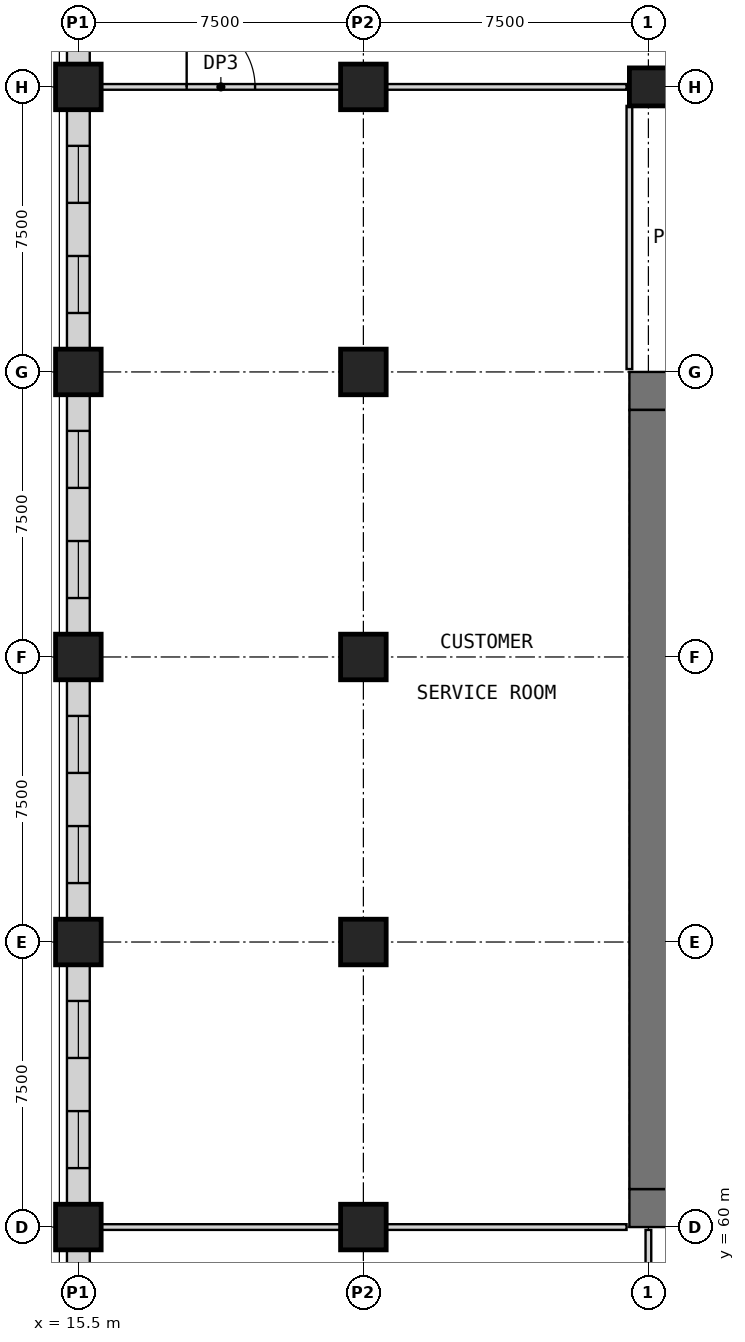
"""IFC4 building model, lengths in metres.
Left out: names, types, materials, properties, quantities, classifications, styles, units other than length and angle.
Written with IfcOpenShell. Run it as: python <this file> out.ifc"""

import sys

from ifc_helpers import new_model, si_unit, direction, frame, frame_2d, origin, origin_2d, place, context, subcontext, project, spatial, rectangle, extrude, element, fill, save


model = new_model("IFC4")
c1 = context("Model", 3, precision=1e-05, world=origin(), true_north=direction((0.0, 1.0)))
c2 = subcontext(c1, "Body", "Model", "MODEL_VIEW")
j1 = project(units=[si_unit("LENGTHUNIT", "METRE"), si_unit("PLANEANGLEUNIT", "RADIAN")], contexts=[c1])
p1 = place(None, origin())
s1 = spatial("IfcSite", under=j1, at=p1, CompositionType="ELEMENT")
p2 = place(p1, origin())
s2 = spatial("IfcBuilding", under=s1, at=p2, CompositionType="ELEMENT")
p3 = place(p2, frame((0.0, 0.0, 13.5)))
s3 = spatial("IfcBuildingStorey", under=s2, at=p3, CompositionType="ELEMENT", Elevation=13.5)
p4 = place(p3, frame((30.5, 90.0, 0.0), z_axis=(0.0, 0.0, 1.0), x_axis=(1.0, 0.0, 0.0)))
e1 = element("IfcColumn", 1, at=p4, inside=s3, PredefinedType="COLUMN", context=c2, shape_type="SweptSolid", body=[
    extrude(rectangle(XDim=1.0, YDim=1.0, at=origin_2d()), origin(), (0.0, 0.0, 1.0), 5.0),
])
for number, where, z_axis, x_axis in (
    (2, (15.5, 60.0, 0.0), (0.0, 0.0, 1.0), (1.0, 0.0, 0.0)),
    (3, (15.5, 67.5, 0.0), (0.0, 0.0, 1.0), (1.0, 0.0, 0.0)),
    (4, (15.5, 75.0, 0.0), (0.0, 0.0, 1.0), (1.0, 0.0, 0.0)),
    (5, (15.5, 82.5, 0.0), (0.0, 0.0, 1.0), (1.0, 0.0, 0.0)),
    (6, (15.5, 90.0, 0.0), (0.0, 0.0, 1.0), (1.0, 0.0, 0.0)),
    (7, (23.0, 60.0, 0.0), (0.0, 0.0, 1.0), (1.0, 0.0, 0.0)),
    (8, (23.0, 67.5, 0.0), (0.0, 0.0, 1.0), (1.0, 0.0, 0.0)),
    (9, (23.0, 75.0, 0.0), (0.0, 0.0, 1.0), (1.0, 0.0, 0.0)),
    (10, (23.0, 82.5, 0.0), (0.0, 0.0, 1.0), (1.0, 0.0, 0.0)),
    (11, (23.0, 90.0, 0.0), (0.0, 0.0, 1.0), (1.0, 0.0, 0.0)),
):
    element("IfcColumn", number, at=place(p3, frame(where, z_axis=z_axis, x_axis=x_axis)), inside=s3, PredefinedType="COLUMN", context=c2, shape_type="SweptSolid", body=[
        extrude(rectangle(XDim=1.2, YDim=1.2, at=origin_2d()), origin(), (0.0, 0.0, 1.0), 5.0),
    ])
p5 = place(p3, frame((30.0, 60.5, 0.0), z_axis=(0.0, 0.0, 1.0), x_axis=(1.0, 0.0, 0.0)))
e12 = element("IfcWall", 12, at=p5, inside=s3, PredefinedType="SHEAR", context=c2, shape_type="SweptSolid", body=[
    extrude(rectangle(XDim=30.0, YDim=1.0, at=frame_2d((15.0, 0.0))), origin(), (0.0, 0.0, 1.0), 5.0),
])
p6 = place(p5, frame((21.9, 0.0, 0.0)))
e13 = element("IfcOpeningElement", 13, at=p6, cuts=e12, PredefinedType="OPENING", context=c2, shape_type="SweptSolid", body=[
    extrude(rectangle(XDim=1.8, YDim=2.1, at=frame_2d((0.9, 1.05))), frame((0.0, 0.51, 0.0), z_axis=(0.0, -1.0, 0.0), x_axis=(1.0, 0.0, 0.0)), (0.0, 0.0, 1.0), 1.02),
])
p7 = place(p5, frame((26.5, 0.0, 0.0)))
e14 = element("IfcOpeningElement", 14, at=p7, cuts=e12, PredefinedType="OPENING", context=c2, shape_type="SweptSolid", body=[
    extrude(rectangle(XDim=1.2, YDim=2.1, at=frame_2d((0.6, 1.05))), frame((0.0, 0.51, 0.0), z_axis=(0.0, -1.0, 0.0), x_axis=(1.0, 0.0, 0.0)), (0.0, 0.0, 1.0), 1.02),
])
p8 = place(p3, frame((30.0, 82.0, 0.0), z_axis=(0.0, 0.0, 1.0), x_axis=(1.0, 0.0, 0.0)))
e15 = element("IfcWall", 15, at=p8, inside=s3, PredefinedType="SHEAR", context=c2, shape_type="SweptSolid", body=[
    extrude(rectangle(XDim=30.0, YDim=1.0, at=frame_2d((15.0, 0.0))), origin(), (0.0, 0.0, 1.0), 5.0),
])
p9 = place(p3, frame((30.5, 61.0, 0.0), z_axis=(0.0, 0.0, 1.0), x_axis=(0.0, 1.0, 0.0)))
e16 = element("IfcWall", 16, at=p9, inside=s3, PredefinedType="SHEAR", context=c2, shape_type="SweptSolid", body=[
    extrude(rectangle(XDim=20.5, YDim=1.0, at=frame_2d((10.25, 0.0))), origin(), (0.0, 0.0, 1.0), 5.0),
])
p10 = place(p3, frame((16.1, 60.0, 0.0), z_axis=(0.0, 0.0, 1.0), x_axis=(1.0, 0.0, 0.0)))
e17 = element("IfcWall", 17, at=p10, inside=s3, PredefinedType="PARTITIONING", context=c2, shape_type="SweptSolid", body=[
    extrude(rectangle(XDim=6.3, YDim=0.15, at=frame_2d((3.15, 0.0))), origin(), (0.0, 0.0, 1.0), 4.7),
])
p11 = place(p3, frame((23.6, 60.0, 0.0), z_axis=(0.0, 0.0, 1.0), x_axis=(1.0, 0.0, 0.0)))
e18 = element("IfcWall", 18, at=p11, inside=s3, PredefinedType="PARTITIONING", context=c2, shape_type="SweptSolid", body=[
    extrude(rectangle(XDim=6.325, YDim=0.15, at=frame_2d((3.163, 0.0))), origin(), (0.0, 0.0, 1.0), 4.7),
])
p12 = place(p3, frame((16.1, 90.0, 0.0), z_axis=(0.0, 0.0, 1.0), x_axis=(1.0, 0.0, 0.0)))
e19 = element("IfcWall", 19, at=p12, inside=s3, PredefinedType="PARTITIONING", context=c2, shape_type="SweptSolid", body=[
    extrude(rectangle(XDim=6.3, YDim=0.15, at=frame_2d((3.15, 0.0))), origin(), (0.0, 0.0, 1.0), 4.7),
])
p13 = place(p12, frame((2.25, 0.0, 0.0)))
e20 = element("IfcOpeningElement", 20, at=p13, cuts=e19, PredefinedType="OPENING", context=c2, shape_type="SweptSolid", body=[
    extrude(rectangle(XDim=1.8, YDim=2.4, at=frame_2d((0.9, 1.2))), frame((0.0, 0.085, 0.0), z_axis=(0.0, -1.0, 0.0), x_axis=(1.0, 0.0, 0.0)), (0.0, 0.0, 1.0), 0.17),
])
p14 = place(p3, frame((23.6, 90.0, 0.0), z_axis=(0.0, 0.0, 1.0), x_axis=(1.0, 0.0, 0.0)))
e21 = element("IfcWall", 21, at=p14, inside=s3, PredefinedType="PARTITIONING", context=c2, shape_type="SweptSolid", body=[
    extrude(rectangle(XDim=6.325, YDim=0.15, at=frame_2d((3.163, 0.0))), origin(), (0.0, 0.0, 1.0), 4.7),
])
p15 = place(p3, frame((15.5, 53.1, 0.0), z_axis=(0.0, 0.0, 1.0), x_axis=(0.0, 1.0, 0.0)))
e22 = element("IfcWall", 22, at=p15, inside=s3, PredefinedType="PARTITIONING", context=c2, shape_type="SweptSolid", body=[
    extrude(rectangle(XDim=6.3, YDim=0.6, at=frame_2d((3.15, 0.0))), origin(), (0.0, 0.0, 1.0), 4.1),
])
p16 = place(p15, frame((0.951, 0.0, 0.9)))
e23 = element("IfcOpeningElement", 23, at=p16, cuts=e22, PredefinedType="OPENING", context=c2, shape_type="SweptSolid", body=[
    extrude(rectangle(XDim=1.5, YDim=2.8, at=frame_2d((0.75, 1.4))), frame((0.0, 0.31, 0.0), z_axis=(0.0, -1.0, 0.0), x_axis=(1.0, 0.0, 0.0)), (0.0, 0.0, 1.0), 0.62),
])
p17 = place(p15, frame((3.849, 0.0, 0.9)))
e24 = element("IfcOpeningElement", 24, at=p17, cuts=e22, PredefinedType="OPENING", context=c2, shape_type="SweptSolid", body=[
    extrude(rectangle(XDim=1.5, YDim=2.8, at=frame_2d((0.75, 1.4))), frame((0.0, 0.31, 0.0), z_axis=(0.0, -1.0, 0.0), x_axis=(1.0, 0.0, 0.0)), (0.0, 0.0, 1.0), 0.62),
])
p18 = place(p3, frame((15.5, 60.6, 0.0), z_axis=(0.0, 0.0, 1.0), x_axis=(0.0, 1.0, 0.0)))
e25 = element("IfcWall", 25, at=p18, inside=s3, PredefinedType="PARTITIONING", context=c2, shape_type="SweptSolid", body=[
    extrude(rectangle(XDim=6.3, YDim=0.6, at=frame_2d((3.15, 0.0))), origin(), (0.0, 0.0, 1.0), 4.1),
])
p19 = place(p18, frame((0.951, 0.0, 0.9)))
e26 = element("IfcOpeningElement", 26, at=p19, cuts=e25, PredefinedType="OPENING", context=c2, shape_type="SweptSolid", body=[
    extrude(rectangle(XDim=1.5, YDim=2.8, at=frame_2d((0.75, 1.4))), frame((0.0, 0.31, 0.0), z_axis=(0.0, -1.0, 0.0), x_axis=(1.0, 0.0, 0.0)), (0.0, 0.0, 1.0), 0.62),
])
p20 = place(p18, frame((3.849, 0.0, 0.9)))
e27 = element("IfcOpeningElement", 27, at=p20, cuts=e25, PredefinedType="OPENING", context=c2, shape_type="SweptSolid", body=[
    extrude(rectangle(XDim=1.5, YDim=2.8, at=frame_2d((0.75, 1.4))), frame((0.0, 0.31, 0.0), z_axis=(0.0, -1.0, 0.0), x_axis=(1.0, 0.0, 0.0)), (0.0, 0.0, 1.0), 0.62),
])
p21 = place(p3, frame((15.5, 68.1, 0.0), z_axis=(0.0, 0.0, 1.0), x_axis=(0.0, 1.0, 0.0)))
e28 = element("IfcWall", 28, at=p21, inside=s3, PredefinedType="PARTITIONING", context=c2, shape_type="SweptSolid", body=[
    extrude(rectangle(XDim=6.3, YDim=0.6, at=frame_2d((3.15, 0.0))), origin(), (0.0, 0.0, 1.0), 4.1),
])
p22 = place(p21, frame((0.951, 0.0, 0.9)))
e29 = element("IfcOpeningElement", 29, at=p22, cuts=e28, PredefinedType="OPENING", context=c2, shape_type="SweptSolid", body=[
    extrude(rectangle(XDim=1.5, YDim=2.8, at=frame_2d((0.75, 1.4))), frame((0.0, 0.31, 0.0), z_axis=(0.0, -1.0, 0.0), x_axis=(1.0, 0.0, 0.0)), (0.0, 0.0, 1.0), 0.62),
])
p23 = place(p21, frame((3.849, 0.0, 0.9)))
e30 = element("IfcOpeningElement", 30, at=p23, cuts=e28, PredefinedType="OPENING", context=c2, shape_type="SweptSolid", body=[
    extrude(rectangle(XDim=1.5, YDim=2.8, at=frame_2d((0.75, 1.4))), frame((0.0, 0.31, 0.0), z_axis=(0.0, -1.0, 0.0), x_axis=(1.0, 0.0, 0.0)), (0.0, 0.0, 1.0), 0.62),
])
p24 = place(p3, frame((15.5, 75.6, 0.0), z_axis=(0.0, 0.0, 1.0), x_axis=(0.0, 1.0, 0.0)))
e31 = element("IfcWall", 31, at=p24, inside=s3, PredefinedType="PARTITIONING", context=c2, shape_type="SweptSolid", body=[
    extrude(rectangle(XDim=6.3, YDim=0.6, at=frame_2d((3.15, 0.0))), origin(), (0.0, 0.0, 1.0), 4.1),
])
p25 = place(p24, frame((0.951, 0.0, 0.9)))
e32 = element("IfcOpeningElement", 32, at=p25, cuts=e31, PredefinedType="OPENING", context=c2, shape_type="SweptSolid", body=[
    extrude(rectangle(XDim=1.5, YDim=2.8, at=frame_2d((0.75, 1.4))), frame((0.0, 0.31, 0.0), z_axis=(0.0, -1.0, 0.0), x_axis=(1.0, 0.0, 0.0)), (0.0, 0.0, 1.0), 0.62),
])
p26 = place(p24, frame((3.849, 0.0, 0.9)))
e33 = element("IfcOpeningElement", 33, at=p26, cuts=e31, PredefinedType="OPENING", context=c2, shape_type="SweptSolid", body=[
    extrude(rectangle(XDim=1.5, YDim=2.8, at=frame_2d((0.75, 1.4))), frame((0.0, 0.31, 0.0), z_axis=(0.0, -1.0, 0.0), x_axis=(1.0, 0.0, 0.0)), (0.0, 0.0, 1.0), 0.62),
])
p27 = place(p3, frame((15.5, 83.1, 0.0), z_axis=(0.0, 0.0, 1.0), x_axis=(0.0, 1.0, 0.0)))
e34 = element("IfcWall", 34, at=p27, inside=s3, PredefinedType="PARTITIONING", context=c2, shape_type="SweptSolid", body=[
    extrude(rectangle(XDim=6.3, YDim=0.6, at=frame_2d((3.15, 0.0))), origin(), (0.0, 0.0, 1.0), 4.1),
])
p28 = place(p27, frame((0.951, 0.0, 0.9)))
e35 = element("IfcOpeningElement", 35, at=p28, cuts=e34, PredefinedType="OPENING", context=c2, shape_type="SweptSolid", body=[
    extrude(rectangle(XDim=1.5, YDim=2.8, at=frame_2d((0.75, 1.4))), frame((0.0, 0.31, 0.0), z_axis=(0.0, -1.0, 0.0), x_axis=(1.0, 0.0, 0.0)), (0.0, 0.0, 1.0), 0.62),
])
p29 = place(p27, frame((3.849, 0.0, 0.9)))
e36 = element("IfcOpeningElement", 36, at=p29, cuts=e34, PredefinedType="OPENING", context=c2, shape_type="SweptSolid", body=[
    extrude(rectangle(XDim=1.5, YDim=2.8, at=frame_2d((0.75, 1.4))), frame((0.0, 0.31, 0.0), z_axis=(0.0, -1.0, 0.0), x_axis=(1.0, 0.0, 0.0)), (0.0, 0.0, 1.0), 0.62),
])
p30 = place(p3, frame((15.5, 90.6, 0.0), z_axis=(0.0, 0.0, 1.0), x_axis=(0.0, 1.0, 0.0)))
e37 = element("IfcWall", 37, at=p30, inside=s3, PredefinedType="PARTITIONING", context=c2, shape_type="SweptSolid", body=[
    extrude(rectangle(XDim=5.8, YDim=0.6, at=frame_2d((2.9, 0.0))), origin(), (0.0, 0.0, 1.0), 4.1),
])
p31 = place(p30, frame((0.816, 0.0, 0.9)))
e38 = element("IfcOpeningElement", 38, at=p31, cuts=e37, PredefinedType="OPENING", context=c2, shape_type="SweptSolid", body=[
    extrude(rectangle(XDim=1.5, YDim=2.8, at=frame_2d((0.75, 1.4))), frame((0.0, 0.31, 0.0), z_axis=(0.0, -1.0, 0.0), x_axis=(1.0, 0.0, 0.0)), (0.0, 0.0, 1.0), 0.62),
])
p32 = place(p30, frame((3.484, 0.0, 0.9)))
e39 = element("IfcOpeningElement", 39, at=p32, cuts=e37, PredefinedType="OPENING", context=c2, shape_type="SweptSolid", body=[
    extrude(rectangle(XDim=1.5, YDim=2.8, at=frame_2d((0.75, 1.4))), frame((0.0, 0.31, 0.0), z_axis=(0.0, -1.0, 0.0), x_axis=(1.0, 0.0, 0.0)), (0.0, 0.0, 1.0), 0.62),
])
for number, where, z_axis, x_axis in (
    (40, (30.5, 53.0, 0.0), (0.0, 0.0, 1.0), (0.0, 1.0, 0.0)),
    (41, (30.0, 82.575, 0.0), (0.0, 0.0, 1.0), (0.0, 1.0, 0.0)),
):
    element("IfcWall", number, at=place(p3, frame(where, z_axis=z_axis, x_axis=x_axis)), inside=s3, PredefinedType="PARTITIONING", context=c2, shape_type="SweptSolid", body=[
        extrude(rectangle(XDim=6.925, YDim=0.15, at=frame_2d((3.462, 0.0))), origin(), (0.0, 0.0, 1.0), 4.7),
    ])
p33 = place(p13, origin())
e42 = element("IfcDoor", 42, at=p33, inside=s3, OperationType="SINGLE_SWING_LEFT", PredefinedType="DOOR", context=c2, shape_type="SweptSolid", body=[
    extrude(rectangle(XDim=1.8, YDim=2.4, at=frame_2d((0.9, 1.2))), frame((0.0, 0.025, 0.0), z_axis=(0.0, -1.0, 0.0), x_axis=(1.0, 0.0, 0.0)), (0.0, 0.0, 1.0), 0.05),
])
fill(e20, e42)
p34 = place(p19, origin())
e43 = element("IfcWindow", 43, at=p34, inside=s3, PartitioningType="SINGLE_PANEL", PredefinedType="WINDOW", context=c2, shape_type="SweptSolid", body=[
    extrude(rectangle(XDim=1.5, YDim=2.8, at=frame_2d((0.75, 1.4))), frame((0.0, 0.03, 0.0), z_axis=(0.0, -1.0, 0.0), x_axis=(1.0, 0.0, 0.0)), (0.0, 0.0, 1.0), 0.06),
])
fill(e26, e43)
p35 = place(p20, origin())
e44 = element("IfcWindow", 44, at=p35, inside=s3, PartitioningType="SINGLE_PANEL", PredefinedType="WINDOW", context=c2, shape_type="SweptSolid", body=[
    extrude(rectangle(XDim=1.5, YDim=2.8, at=frame_2d((0.75, 1.4))), frame((0.0, 0.03, 0.0), z_axis=(0.0, -1.0, 0.0), x_axis=(1.0, 0.0, 0.0)), (0.0, 0.0, 1.0), 0.06),
])
fill(e27, e44)
p36 = place(p22, origin())
e45 = element("IfcWindow", 45, at=p36, inside=s3, PartitioningType="SINGLE_PANEL", PredefinedType="WINDOW", context=c2, shape_type="SweptSolid", body=[
    extrude(rectangle(XDim=1.5, YDim=2.8, at=frame_2d((0.75, 1.4))), frame((0.0, 0.03, 0.0), z_axis=(0.0, -1.0, 0.0), x_axis=(1.0, 0.0, 0.0)), (0.0, 0.0, 1.0), 0.06),
])
fill(e29, e45)
p37 = place(p23, origin())
e46 = element("IfcWindow", 46, at=p37, inside=s3, PartitioningType="SINGLE_PANEL", PredefinedType="WINDOW", context=c2, shape_type="SweptSolid", body=[
    extrude(rectangle(XDim=1.5, YDim=2.8, at=frame_2d((0.75, 1.4))), frame((0.0, 0.03, 0.0), z_axis=(0.0, -1.0, 0.0), x_axis=(1.0, 0.0, 0.0)), (0.0, 0.0, 1.0), 0.06),
])
fill(e30, e46)
p38 = place(p25, origin())
e47 = element("IfcWindow", 47, at=p38, inside=s3, PartitioningType="SINGLE_PANEL", PredefinedType="WINDOW", context=c2, shape_type="SweptSolid", body=[
    extrude(rectangle(XDim=1.5, YDim=2.8, at=frame_2d((0.75, 1.4))), frame((0.0, 0.03, 0.0), z_axis=(0.0, -1.0, 0.0), x_axis=(1.0, 0.0, 0.0)), (0.0, 0.0, 1.0), 0.06),
])
fill(e32, e47)
p39 = place(p26, origin())
e48 = element("IfcWindow", 48, at=p39, inside=s3, PartitioningType="SINGLE_PANEL", PredefinedType="WINDOW", context=c2, shape_type="SweptSolid", body=[
    extrude(rectangle(XDim=1.5, YDim=2.8, at=frame_2d((0.75, 1.4))), frame((0.0, 0.03, 0.0), z_axis=(0.0, -1.0, 0.0), x_axis=(1.0, 0.0, 0.0)), (0.0, 0.0, 1.0), 0.06),
])
fill(e33, e48)
p40 = place(p28, origin())
e49 = element("IfcWindow", 49, at=p40, inside=s3, PartitioningType="SINGLE_PANEL", PredefinedType="WINDOW", context=c2, shape_type="SweptSolid", body=[
    extrude(rectangle(XDim=1.5, YDim=2.8, at=frame_2d((0.75, 1.4))), frame((0.0, 0.03, 0.0), z_axis=(0.0, -1.0, 0.0), x_axis=(1.0, 0.0, 0.0)), (0.0, 0.0, 1.0), 0.06),
])
fill(e35, e49)
p41 = place(p29, origin())
e50 = element("IfcWindow", 50, at=p41, inside=s3, PartitioningType="SINGLE_PANEL", PredefinedType="WINDOW", context=c2, shape_type="SweptSolid", body=[
    extrude(rectangle(XDim=1.5, YDim=2.8, at=frame_2d((0.75, 1.4))), frame((0.0, 0.03, 0.0), z_axis=(0.0, -1.0, 0.0), x_axis=(1.0, 0.0, 0.0)), (0.0, 0.0, 1.0), 0.06),
])
fill(e36, e50)
save(model, sys.argv[1])
